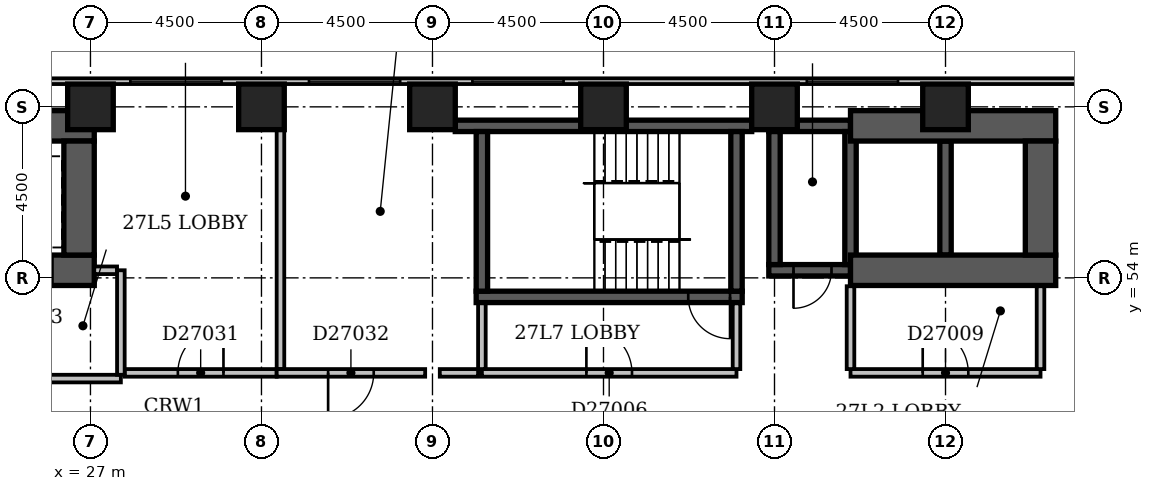
"""IFC4 building model, lengths in metres.
Left out: names, types, materials, properties, quantities, classifications, styles, units other than length and angle.
Written with IfcOpenShell. Run it as: python <this file> out.ifc"""

import sys

from ifc_helpers import new_model, si_unit, direction, frame, frame_2d, origin, origin_2d, place, context, subcontext, project, spatial, rectangle, extrude, element, fill, save


model = new_model("IFC4")
c1 = context("Model", 3, precision=1e-05, world=origin(), true_north=direction((0.0, 1.0)))
c2 = subcontext(c1, "Body", "Model", "MODEL_VIEW")
j1 = project(units=[si_unit("LENGTHUNIT", "METRE"), si_unit("PLANEANGLEUNIT", "RADIAN")], contexts=[c1])
p1 = place(None, origin())
s1 = spatial("IfcSite", under=j1, at=p1, CompositionType="ELEMENT")
p2 = place(p1, origin())
s2 = spatial("IfcBuilding", under=s1, at=p2, CompositionType="ELEMENT")
p3 = place(p2, frame((0.0, 0.0, 108.2)))
s3 = spatial("IfcBuildingStorey", under=s2, at=p3, CompositionType="ELEMENT", Elevation=108.2)
p4 = place(p3, frame((23.8, 54.2, -0.45), z_axis=(0.0, 0.0, 1.0), x_axis=(1.0, 0.0, 0.0)))
e1 = element("IfcWall", 1, at=p4, inside=s3, PredefinedType="SHEAR", context=c2, shape_type="SweptSolid", body=[
    extrude(rectangle(XDim=3.3, YDim=0.8, at=frame_2d((1.65, 0.0))), origin(), (0.0, 0.0, 1.0), 5.35),
])
p5 = place(p4, frame((1.1, 0.0, 0.45)))
e2 = element("IfcOpeningElement", 2, at=p5, cuts=e1, PredefinedType="OPENING", context=c2, shape_type="SweptSolid", body=[
    extrude(rectangle(XDim=1.1, YDim=2.1, at=frame_2d((0.55, 1.05))), frame((0.0, 0.412, 0.0), z_axis=(0.0, -1.0, 0.0), x_axis=(1.0, 0.0, 0.0)), (0.0, 0.0, 1.0), 0.824),
])
p6 = place(p3, frame((23.8, 58.0, -0.45), z_axis=(0.0, 0.0, 1.0), x_axis=(1.0, 0.0, 0.0)))
e3 = element("IfcWall", 3, at=p6, inside=s3, PredefinedType="SHEAR", context=c2, shape_type="SweptSolid", body=[
    extrude(rectangle(XDim=3.3, YDim=0.8, at=frame_2d((1.65, 0.0))), origin(), (0.0, 0.0, 1.0), 5.35),
])
p7 = place(p3, frame((26.7, 54.6, -0.45), z_axis=(0.0, 0.0, 1.0), x_axis=(0.0, 1.0, 0.0)))
e4 = element("IfcWall", 4, at=p7, inside=s3, PredefinedType="SHEAR", context=c2, shape_type="SweptSolid", body=[
    extrude(rectangle(XDim=3.0, YDim=0.8, at=frame_2d((1.5, 0.0))), origin(), (0.0, 0.0, 1.0), 5.35),
])
p8 = place(p3, frame((36.6, 58.0, -0.45), z_axis=(0.0, 0.0, 1.0), x_axis=(1.0, 0.0, 0.0)))
e5 = element("IfcWall", 5, at=p8, inside=s3, PredefinedType="SHEAR", context=c2, shape_type="SweptSolid", body=[
    extrude(rectangle(XDim=7.8, YDim=0.3, at=frame_2d((3.9, 0.0))), origin(), (0.0, 0.0, 1.0), 5.35),
])
p9 = place(p3, frame((37.15, 53.5, -0.45), z_axis=(0.0, 0.0, 1.0), x_axis=(1.0, 0.0, 0.0)))
e6 = element("IfcWall", 6, at=p9, inside=s3, PredefinedType="SHEAR", context=c2, shape_type="SweptSolid", body=[
    extrude(rectangle(XDim=7.0, YDim=0.3, at=frame_2d((3.5, 0.0))), origin(), (0.0, 0.0, 1.0), 5.35),
])
p10 = place(p9, frame((5.58, 0.0, 0.45)))
e7 = element("IfcOpeningElement", 7, at=p10, cuts=e6, PredefinedType="OPENING", context=c2, shape_type="SweptSolid", body=[
    extrude(rectangle(XDim=1.1, YDim=2.1, at=frame_2d((0.55, 1.05))), frame((0.0, 0.162, 0.0), z_axis=(0.0, -1.0, 0.0), x_axis=(1.0, 0.0, 0.0)), (0.0, 0.0, 1.0), 0.324),
])
for number, where, z_axis, x_axis in (
    (8, (37.3, 53.65, -0.45), (0.0, 0.0, 1.0), (0.0, 1.0, 0.0)),
    (9, (44.0, 53.65, -0.45), (0.0, 0.0, 1.0), (0.0, 1.0, 0.0)),
):
    element("IfcWall", number, at=place(p3, frame(where, z_axis=z_axis, x_axis=x_axis)), inside=s3, PredefinedType="SHEAR", context=c2, shape_type="SweptSolid", body=[
        extrude(rectangle(XDim=4.2, YDim=0.3, at=frame_2d((2.1, 0.0))), origin(), (0.0, 0.0, 1.0), 5.35),
    ])
p11 = place(p3, frame((44.85, 54.2, -0.45), z_axis=(0.0, 0.0, 1.0), x_axis=(1.0, 0.0, 0.0)))
e10 = element("IfcWall", 10, at=p11, inside=s3, PredefinedType="SHEAR", context=c2, shape_type="SweptSolid", body=[
    extrude(rectangle(XDim=2.15, YDim=0.3, at=frame_2d((1.075, 0.0))), origin(), (0.0, 0.0, 1.0), 5.35),
])
p12 = place(p11, frame((0.65, 0.0, 0.45)))
e11 = element("IfcOpeningElement", 11, at=p12, cuts=e10, PredefinedType="OPENING", context=c2, shape_type="SweptSolid", body=[
    extrude(rectangle(XDim=1.0, YDim=2.1, at=frame_2d((0.5, 1.05))), frame((0.0, 0.162, 0.0), z_axis=(0.0, -1.0, 0.0), x_axis=(1.0, 0.0, 0.0)), (0.0, 0.0, 1.0), 0.324),
])
p13 = place(p3, frame((44.85, 58.0, -0.45), z_axis=(0.0, 0.0, 1.0), x_axis=(1.0, 0.0, 0.0)))
e12 = element("IfcWall", 12, at=p13, inside=s3, PredefinedType="SHEAR", context=c2, shape_type="SweptSolid", body=[
    extrude(rectangle(XDim=2.15, YDim=0.3, at=frame_2d((1.075, 0.0))), origin(), (0.0, 0.0, 1.0), 5.35),
])
p14 = place(p3, frame((45.0, 54.35, -0.45), z_axis=(0.0, 0.0, 1.0), x_axis=(0.0, 1.0, 0.0)))
e13 = element("IfcWall", 13, at=p14, inside=s3, PredefinedType="SHEAR", context=c2, shape_type="SweptSolid", body=[
    extrude(rectangle(XDim=3.5, YDim=0.3, at=frame_2d((1.75, 0.0))), origin(), (0.0, 0.0, 1.0), 5.35),
])
p15 = place(p3, frame((47.0, 54.2, -0.45), z_axis=(0.0, 0.0, 1.0), x_axis=(1.0, 0.0, 0.0)))
e14 = element("IfcWall", 14, at=p15, inside=s3, PredefinedType="SHEAR", context=c2, shape_type="SweptSolid", body=[
    extrude(rectangle(XDim=5.4, YDim=0.8, at=frame_2d((2.7, 0.0))), origin(), (0.0, 0.0, 1.0), 5.35),
])
p16 = place(p3, frame((47.0, 54.35, -0.45), z_axis=(0.0, 0.0, 1.0), x_axis=(0.0, 1.0, 0.0)))
e15 = element("IfcWall", 15, at=p16, inside=s3, PredefinedType="SHEAR", context=c2, shape_type="SweptSolid", body=[
    extrude(rectangle(XDim=3.5, YDim=0.3, at=frame_2d((1.75, 0.0))), origin(), (0.0, 0.0, 1.0), 5.35),
])
p17 = place(p3, frame((47.0, 58.0, -0.45), z_axis=(0.0, 0.0, 1.0), x_axis=(1.0, 0.0, 0.0)))
e16 = element("IfcWall", 16, at=p17, inside=s3, PredefinedType="SHEAR", context=c2, shape_type="SweptSolid", body=[
    extrude(rectangle(XDim=5.4, YDim=0.8, at=frame_2d((2.7, 0.0))), origin(), (0.0, 0.0, 1.0), 5.35),
])
p18 = place(p3, frame((49.5, 54.6, -0.45), z_axis=(0.0, 0.0, 1.0), x_axis=(0.0, 1.0, 0.0)))
e17 = element("IfcWall", 17, at=p18, inside=s3, PredefinedType="SHEAR", context=c2, shape_type="SweptSolid", body=[
    extrude(rectangle(XDim=3.0, YDim=0.3, at=frame_2d((1.5, 0.0))), origin(), (0.0, 0.0, 1.0), 5.35),
])
p19 = place(p3, frame((52.0, 54.6, -0.45), z_axis=(0.0, 0.0, 1.0), x_axis=(0.0, 1.0, 0.0)))
e18 = element("IfcWall", 18, at=p19, inside=s3, PredefinedType="SHEAR", context=c2, shape_type="SweptSolid", body=[
    extrude(rectangle(XDim=3.0, YDim=0.8, at=frame_2d((1.5, 0.0))), origin(), (0.0, 0.0, 1.0), 5.35),
])
for number, where, z_axis, x_axis in (
    (19, (27.0, 58.5, -0.45), (0.0, 0.0, 1.0), (1.0, 0.0, 0.0)),
    (20, (31.5, 58.5, -0.45), (0.0, 0.0, 1.0), (1.0, 0.0, 0.0)),
    (21, (36.0, 58.5, -0.45), (0.0, 0.0, 1.0), (1.0, 0.0, 0.0)),
    (22, (40.5, 58.5, -0.45), (0.0, 0.0, 1.0), (1.0, 0.0, 0.0)),
    (23, (45.0, 58.5, -0.45), (0.0, 0.0, 1.0), (1.0, 0.0, 0.0)),
    (24, (49.5, 58.5, -0.45), (0.0, 0.0, 1.0), (1.0, 0.0, 0.0)),
):
    element("IfcColumn", number, at=place(p3, frame(where, z_axis=z_axis, x_axis=x_axis)), inside=s3, PredefinedType="COLUMN", context=c2, shape_type="SweptSolid", body=[
        extrude(rectangle(XDim=1.2, YDim=1.2, at=origin_2d()), origin(), (0.0, 0.0, 1.0), 5.35),
    ])
p20 = place(p3, frame((68.1, 59.175, 0.0), z_axis=(0.0, 0.0, 1.0), x_axis=(-1.0, 0.0, 0.0)))
e25 = element("IfcWall", 25, at=p20, inside=s3, PredefinedType="STANDARD", context=c2, shape_type="SweptSolid", body=[
    extrude(rectangle(XDim=68.85, YDim=0.15, at=frame_2d((34.425, 0.0))), origin(), (0.0, 0.0, 1.0), 4.3),
])
p21 = place(p20, frame((1.65, 0.0, 0.6)))
e26 = element("IfcOpeningElement", 26, at=p21, cuts=e25, PredefinedType="OPENING", context=c2, shape_type="SweptSolid", body=[
    extrude(rectangle(XDim=2.4, YDim=2.4, at=frame_2d((1.2, 1.2))), frame((0.0, 0.087, 0.0), z_axis=(0.0, -1.0, 0.0), x_axis=(1.0, 0.0, 0.0)), (0.0, 0.0, 1.0), 0.174),
])
p22 = place(p20, frame((10.65, 0.0, 0.6)))
e27 = element("IfcOpeningElement", 27, at=p22, cuts=e25, PredefinedType="OPENING", context=c2, shape_type="SweptSolid", body=[
    extrude(rectangle(XDim=2.4, YDim=2.4, at=frame_2d((1.2, 1.2))), frame((0.0, 0.087, 0.0), z_axis=(0.0, -1.0, 0.0), x_axis=(1.0, 0.0, 0.0)), (0.0, 0.0, 1.0), 0.174),
])
p23 = place(p20, frame((19.85, 0.0, 0.6)))
e28 = element("IfcOpeningElement", 28, at=p23, cuts=e25, PredefinedType="OPENING", context=c2, shape_type="SweptSolid", body=[
    extrude(rectangle(XDim=2.4, YDim=2.4, at=frame_2d((1.2, 1.2))), frame((0.0, 0.087, 0.0), z_axis=(0.0, -1.0, 0.0), x_axis=(1.0, 0.0, 0.0)), (0.0, 0.0, 1.0), 0.174),
])
p24 = place(p20, frame((28.65, 0.0, 0.6)))
e29 = element("IfcOpeningElement", 29, at=p24, cuts=e25, PredefinedType="OPENING", context=c2, shape_type="SweptSolid", body=[
    extrude(rectangle(XDim=2.4, YDim=2.4, at=frame_2d((1.2, 1.2))), frame((0.0, 0.087, 0.0), z_axis=(0.0, -1.0, 0.0), x_axis=(1.0, 0.0, 0.0)), (0.0, 0.0, 1.0), 0.174),
])
p25 = place(p20, frame((32.95, 0.0, 0.6)))
e30 = element("IfcOpeningElement", 30, at=p25, cuts=e25, PredefinedType="OPENING", context=c2, shape_type="SweptSolid", body=[
    extrude(rectangle(XDim=2.4, YDim=2.4, at=frame_2d((1.2, 1.2))), frame((0.0, 0.087, 0.0), z_axis=(0.0, -1.0, 0.0), x_axis=(1.0, 0.0, 0.0)), (0.0, 0.0, 1.0), 0.174),
])
p26 = place(p20, frame((37.65, 0.0, 0.6)))
e31 = element("IfcOpeningElement", 31, at=p26, cuts=e25, PredefinedType="OPENING", context=c2, shape_type="SweptSolid", body=[
    extrude(rectangle(XDim=2.4, YDim=2.4, at=frame_2d((1.2, 1.2))), frame((0.0, 0.087, 0.0), z_axis=(0.0, -1.0, 0.0), x_axis=(1.0, 0.0, 0.0)), (0.0, 0.0, 1.0), 0.174),
])
p27 = place(p20, frame((46.85, 0.0, 0.6)))
e32 = element("IfcOpeningElement", 32, at=p27, cuts=e25, PredefinedType="OPENING", context=c2, shape_type="SweptSolid", body=[
    extrude(rectangle(XDim=2.4, YDim=2.4, at=frame_2d((1.2, 1.2))), frame((0.0, 0.087, 0.0), z_axis=(0.0, -1.0, 0.0), x_axis=(1.0, 0.0, 0.0)), (0.0, 0.0, 1.0), 0.174),
])
p28 = place(p20, frame((55.65, 0.0, 0.6)))
e33 = element("IfcOpeningElement", 33, at=p28, cuts=e25, PredefinedType="OPENING", context=c2, shape_type="SweptSolid", body=[
    extrude(rectangle(XDim=2.4, YDim=2.4, at=frame_2d((1.2, 1.2))), frame((0.0, 0.087, 0.0), z_axis=(0.0, -1.0, 0.0), x_axis=(1.0, 0.0, 0.0)), (0.0, 0.0, 1.0), 0.174),
])
p29 = place(p20, frame((64.65, 0.0, 0.6)))
e34 = element("IfcOpeningElement", 34, at=p29, cuts=e25, PredefinedType="OPENING", context=c2, shape_type="SweptSolid", body=[
    extrude(rectangle(XDim=2.4, YDim=2.4, at=frame_2d((1.2, 1.2))), frame((0.0, 0.087, 0.0), z_axis=(0.0, -1.0, 0.0), x_axis=(1.0, 0.0, 0.0)), (0.0, 0.0, 1.0), 0.174),
])
p30 = place(p3, frame((47.0, 51.5, 0.0), z_axis=(0.0, 0.0, 1.0), x_axis=(1.0, 0.0, 0.0)))
e35 = element("IfcWall", 35, at=p30, inside=s3, PredefinedType="PARTITIONING", context=c2, shape_type="SweptSolid", body=[
    extrude(rectangle(XDim=5.0, YDim=0.2, at=frame_2d((2.5, 0.0))), origin(), (0.0, 0.0, 1.0), 4.9),
])
p31 = place(p30, frame((1.9, 0.0, 0.0)))
e36 = element("IfcOpeningElement", 36, at=p31, cuts=e35, PredefinedType="OPENING", context=c2, shape_type="SweptSolid", body=[
    extrude(rectangle(XDim=1.2, YDim=2.1, at=frame_2d((0.6, 1.05))), frame((0.0, 0.112, 0.0), z_axis=(0.0, -1.0, 0.0), x_axis=(1.0, 0.0, 0.0)), (0.0, 0.0, 1.0), 0.224),
])
for number, where, z_axis, x_axis in (
    (37, (52.0, 51.6, 0.0), (0.0, 0.0, 1.0), (0.0, 1.0, 0.0)),
    (38, (47.0, 51.6, 0.0), (0.0, 0.0, 1.0), (0.0, 1.0, 0.0)),
):
    element("IfcWall", number, at=place(p3, frame(where, z_axis=z_axis, x_axis=x_axis)), inside=s3, PredefinedType="PARTITIONING", context=c2, shape_type="SweptSolid", body=[
        extrude(rectangle(XDim=2.18, YDim=0.2, at=frame_2d((1.09, 0.0))), origin(), (0.0, 0.0, 1.0), 4.9),
    ])
p32 = place(p3, frame((23.0, 51.35, 0.0), z_axis=(0.0, 0.0, 1.0), x_axis=(1.0, 0.0, 0.0)))
e39 = element("IfcWall", 39, at=p32, inside=s3, PredefinedType="PARTITIONING", context=c2, shape_type="SweptSolid", body=[
    extrude(rectangle(XDim=4.8, YDim=0.2, at=frame_2d((2.4, 0.0))), origin(), (0.0, 0.0, 1.0), 4.9),
])
p33 = place(p32, frame((1.65, 0.0, 0.0)))
e40 = element("IfcOpeningElement", 40, at=p33, cuts=e39, PredefinedType="OPENING", context=c2, shape_type="SweptSolid", body=[
    extrude(rectangle(XDim=1.2, YDim=2.1, at=frame_2d((0.6, 1.05))), frame((0.0, 0.112, 0.0), z_axis=(0.0, -1.0, 0.0), x_axis=(1.0, 0.0, 0.0)), (0.0, 0.0, 1.0), 0.224),
])
p34 = place(p3, frame((27.8, 51.45, 0.0), z_axis=(0.0, 0.0, 1.0), x_axis=(0.0, 1.0, 0.0)))
e41 = element("IfcWall", 41, at=p34, inside=s3, PredefinedType="PARTITIONING", context=c2, shape_type="SweptSolid", body=[
    extrude(rectangle(XDim=2.75, YDim=0.2, at=frame_2d((1.375, 0.0))), origin(), (0.0, 0.0, 1.0), 4.9),
])
p35 = place(p3, frame((27.1, 54.2, 0.0), z_axis=(0.0, 0.0, 1.0), x_axis=(1.0, 0.0, 0.0)))
e42 = element("IfcWall", 42, at=p35, inside=s3, PredefinedType="PARTITIONING", context=c2, shape_type="SweptSolid", body=[
    extrude(rectangle(XDim=0.6, YDim=0.2, at=frame_2d((0.3, 0.0))), origin(), (0.0, 0.0, 1.0), 4.9),
])
p36 = place(p3, frame((37.3, 51.5, 0.0), z_axis=(0.0, 0.0, 1.0), x_axis=(1.0, 0.0, 0.0)))
e43 = element("IfcWall", 43, at=p36, inside=s3, PredefinedType="PARTITIONING", context=c2, shape_type="SweptSolid", body=[
    extrude(rectangle(XDim=6.7, YDim=0.2, at=frame_2d((3.35, 0.0))), origin(), (0.0, 0.0, 1.0), 4.9),
])
p37 = place(p36, frame((2.75, 0.0, 0.0)))
e44 = element("IfcOpeningElement", 44, at=p37, cuts=e43, PredefinedType="OPENING", context=c2, shape_type="SweptSolid", body=[
    extrude(rectangle(XDim=1.2, YDim=2.1, at=frame_2d((0.6, 1.05))), frame((0.0, 0.112, 0.0), z_axis=(0.0, -1.0, 0.0), x_axis=(1.0, 0.0, 0.0)), (0.0, 0.0, 1.0), 0.224),
])
for number, where, z_axis, x_axis in (
    (45, (44.0, 51.6, 0.0), (0.0, 0.0, 1.0), (0.0, 1.0, 0.0)),
    (46, (37.3, 51.6, 0.0), (0.0, 0.0, 1.0), (0.0, 1.0, 0.0)),
):
    element("IfcWall", number, at=place(p3, frame(where, z_axis=z_axis, x_axis=x_axis)), inside=s3, PredefinedType="PARTITIONING", context=c2, shape_type="SweptSolid", body=[
        extrude(rectangle(XDim=1.73, YDim=0.2, at=frame_2d((0.865, 0.0))), origin(), (0.0, 0.0, 1.0), 4.9),
    ])
p38 = place(p3, frame((31.9, 51.5, 0.0), z_axis=(0.0, 0.0, 1.0), x_axis=(-1.0, 0.0, 0.0)))
e47 = element("IfcWall", 47, at=p38, inside=s3, PredefinedType="PARTITIONING", context=c2, shape_type="SweptSolid", body=[
    extrude(rectangle(XDim=4.0, YDim=0.2, at=frame_2d((2.0, 0.0))), origin(), (0.0, 0.0, 1.0), 4.9),
])
p39 = place(p38, frame((1.4, 0.0, 0.0)))
e48 = element("IfcOpeningElement", 48, at=p39, cuts=e47, PredefinedType="OPENING", context=c2, shape_type="SweptSolid", body=[
    extrude(rectangle(XDim=1.2, YDim=2.1, at=frame_2d((0.6, 1.05))), frame((0.0, 0.112, 0.0), z_axis=(0.0, -1.0, 0.0), x_axis=(1.0, 0.0, 0.0)), (0.0, 0.0, 1.0), 0.224),
])
p40 = place(p3, frame((37.2, 51.5, 0.0), z_axis=(0.0, 0.0, 1.0), x_axis=(-1.0, 0.0, 0.0)))
e49 = element("IfcWall", 49, at=p40, inside=s3, PredefinedType="PARTITIONING", context=c2, shape_type="SweptSolid", body=[
    extrude(rectangle(XDim=1.008, YDim=0.2, at=frame_2d((0.504, 0.0))), origin(), (0.0, 0.0, 1.0), 4.9),
])
p41 = place(p3, frame((35.808, 51.5, 0.0), z_axis=(0.0, 0.0, 1.0), x_axis=(-1.0, 0.0, 0.0)))
e50 = element("IfcWall", 50, at=p41, inside=s3, PredefinedType="PARTITIONING", context=c2, shape_type="SweptSolid", body=[
    extrude(rectangle(XDim=3.908, YDim=0.2, at=frame_2d((1.954, 0.0))), origin(), (0.0, 0.0, 1.0), 4.9),
])
p42 = place(p41, frame((1.354, 0.0, 0.0)))
e51 = element("IfcOpeningElement", 51, at=p42, cuts=e50, PredefinedType="OPENING", context=c2, shape_type="SweptSolid", body=[
    extrude(rectangle(XDim=1.2, YDim=2.1, at=frame_2d((0.6, 1.05))), frame((0.0, 0.112, 0.0), z_axis=(0.0, -1.0, 0.0), x_axis=(1.0, 0.0, 0.0)), (0.0, 0.0, 1.0), 0.224),
])
p43 = place(p3, frame((32.0, 58.309, 0.0), z_axis=(0.0, 0.0, 1.0), x_axis=(0.0, -1.0, 0.0)))
e52 = element("IfcWall", 52, at=p43, inside=s3, PredefinedType="PARTITIONING", context=c2, shape_type="SweptSolid", body=[
    extrude(rectangle(XDim=6.708, YDim=0.2, at=frame_2d((3.354, 0.0))), origin(), (0.0, 0.0, 1.0), 4.9),
])
p44 = place(p23, origin())
e53 = element("IfcWindow", 53, at=p44, inside=s3, PartitioningType="SINGLE_PANEL", PredefinedType="USERDEFINED", context=c2, shape_type="SweptSolid", body=[
    extrude(rectangle(XDim=2.4, YDim=2.4, at=frame_2d((1.2, 1.2))), frame((0.0, 0.03, 0.0), z_axis=(0.0, -1.0, 0.0), x_axis=(1.0, 0.0, 0.0)), (0.0, 0.0, 1.0), 0.06),
])
fill(e28, e53)
p45 = place(p24, origin())
e54 = element("IfcWindow", 54, at=p45, inside=s3, PartitioningType="SINGLE_PANEL", PredefinedType="USERDEFINED", context=c2, shape_type="SweptSolid", body=[
    extrude(rectangle(XDim=2.4, YDim=2.4, at=frame_2d((1.2, 1.2))), frame((0.0, 0.03, 0.0), z_axis=(0.0, -1.0, 0.0), x_axis=(1.0, 0.0, 0.0)), (0.0, 0.0, 1.0), 0.06),
])
fill(e29, e54)
p46 = place(p25, origin())
e55 = element("IfcWindow", 55, at=p46, inside=s3, PartitioningType="SINGLE_PANEL", PredefinedType="USERDEFINED", context=c2, shape_type="SweptSolid", body=[
    extrude(rectangle(XDim=2.4, YDim=2.4, at=frame_2d((1.2, 1.2))), frame((0.0, 0.03, 0.0), z_axis=(0.0, -1.0, 0.0), x_axis=(1.0, 0.0, 0.0)), (0.0, 0.0, 1.0), 0.06),
])
fill(e30, e55)
p47 = place(p26, origin())
e56 = element("IfcWindow", 56, at=p47, inside=s3, PartitioningType="SINGLE_PANEL", PredefinedType="USERDEFINED", context=c2, shape_type="SweptSolid", body=[
    extrude(rectangle(XDim=2.4, YDim=2.4, at=frame_2d((1.2, 1.2))), frame((0.0, 0.03, 0.0), z_axis=(0.0, -1.0, 0.0), x_axis=(1.0, 0.0, 0.0)), (0.0, 0.0, 1.0), 0.06),
])
fill(e31, e56)
p48 = place(p5, origin())
e57 = element("IfcDoor", 57, at=p48, inside=s3, OperationType="SLIDING_TO_LEFT", PredefinedType="DOOR", context=c2, shape_type="SweptSolid", body=[
    extrude(rectangle(XDim=1.1, YDim=2.1, at=frame_2d((0.55, 1.05))), frame((0.0, 0.025, 0.0), z_axis=(0.0, -1.0, 0.0), x_axis=(1.0, 0.0, 0.0)), (0.0, 0.0, 1.0), 0.05),
])
fill(e2, e57)
p49 = place(p37, origin())
e58 = element("IfcDoor", 58, at=p49, inside=s3, OperationType="SINGLE_SWING_LEFT", PredefinedType="DOOR", context=c2, shape_type="SweptSolid", body=[
    extrude(rectangle(XDim=1.2, YDim=2.1, at=frame_2d((0.6, 1.05))), frame((0.0, 0.025, 0.0), z_axis=(0.0, -1.0, 0.0), x_axis=(1.0, 0.0, 0.0)), (0.0, 0.0, 1.0), 0.05),
])
fill(e44, e58)
p50 = place(p31, origin())
e59 = element("IfcDoor", 59, at=p50, inside=s3, OperationType="SINGLE_SWING_LEFT", PredefinedType="DOOR", context=c2, shape_type="SweptSolid", body=[
    extrude(rectangle(XDim=1.2, YDim=2.1, at=frame_2d((0.6, 1.05))), frame((0.0, 0.025, 0.0), z_axis=(0.0, -1.0, 0.0), x_axis=(1.0, 0.0, 0.0)), (0.0, 0.0, 1.0), 0.05),
])
fill(e36, e59)
p51 = place(p12, frame((1.0, 0.0, 0.0), z_axis=(0.0, 0.0, 1.0), x_axis=(-1.0, 0.0, 0.0)))
e60 = element("IfcDoor", 60, at=p51, inside=s3, OperationType="SINGLE_SWING_RIGHT", PredefinedType="DOOR", context=c2, shape_type="SweptSolid", body=[
    extrude(rectangle(XDim=1.0, YDim=2.1, at=frame_2d((0.5, 1.05))), frame((0.0, 0.025, 0.0), z_axis=(0.0, -1.0, 0.0), x_axis=(1.0, 0.0, 0.0)), (0.0, 0.0, 1.0), 0.05),
])
fill(e11, e60)
p52 = place(p10, origin())
e61 = element("IfcDoor", 61, at=p52, inside=s3, OperationType="SINGLE_SWING_RIGHT", PredefinedType="DOOR", context=c2, shape_type="SweptSolid", body=[
    extrude(rectangle(XDim=1.1, YDim=2.1, at=frame_2d((0.55, 1.05))), frame((0.0, 0.025, 0.0), z_axis=(0.0, -1.0, 0.0), x_axis=(1.0, 0.0, 0.0)), (0.0, 0.0, 1.0), 0.05),
])
fill(e7, e61)
p53 = place(p39, frame((1.2, 0.0, 0.0), z_axis=(0.0, 0.0, 1.0), x_axis=(-1.0, 0.0, 0.0)))
e62 = element("IfcDoor", 62, at=p53, inside=s3, OperationType="SINGLE_SWING_RIGHT", PredefinedType="DOOR", context=c2, shape_type="SweptSolid", body=[
    extrude(rectangle(XDim=1.2, YDim=2.1, at=frame_2d((0.6, 1.05))), frame((0.0, 0.025, 0.0), z_axis=(0.0, -1.0, 0.0), x_axis=(1.0, 0.0, 0.0)), (0.0, 0.0, 1.0), 0.05),
])
fill(e48, e62)
p54 = place(p42, frame((1.2, 0.0, 0.0), z_axis=(0.0, 0.0, 1.0), x_axis=(-1.0, 0.0, 0.0)))
e63 = element("IfcDoor", 63, at=p54, inside=s3, OperationType="SINGLE_SWING_LEFT", PredefinedType="DOOR", context=c2, shape_type="SweptSolid", body=[
    extrude(rectangle(XDim=1.2, YDim=2.1, at=frame_2d((0.6, 1.05))), frame((0.0, 0.025, 0.0), z_axis=(0.0, -1.0, 0.0), x_axis=(1.0, 0.0, 0.0)), (0.0, 0.0, 1.0), 0.05),
])
fill(e51, e63)
save(model, sys.argv[1])
